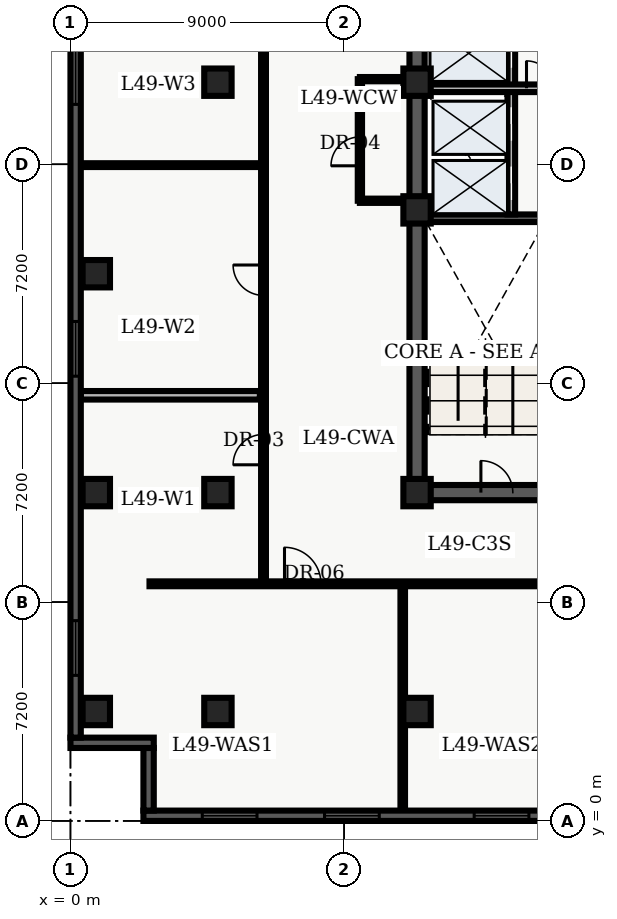
"""IFC4 building model, lengths in metres.
Left out: names, types, materials, properties, quantities, classifications, styles, units other than length and angle.
Written with IfcOpenShell. Run it as: python <this file> out.ifc"""

import sys

from ifc_helpers import new_model, entity, si_unit, converted_unit, direction, frame, origin_with_axes, origin_2d_with_axis, place, context, subcontext, project, spatial, polyline, rectangle, outline, extrude, element, fill, save


model = new_model("IFC4")
c1 = context("Model", 3, precision=1e-05, world=origin_with_axes(), true_north=direction((0.0, 1.0)))
c2 = subcontext(c1, "Body", "Model", "MODEL_VIEW")
j1 = project(units=[si_unit("LENGTHUNIT", "METRE"), converted_unit("PLANEANGLEUNIT", "DEGREE", entity("IfcPlaneAngleMeasure", 0.017), si_unit("PLANEANGLEUNIT", "RADIAN"), dimensions=[0, 0, 0, 0, 0, 0, 0])], contexts=[c1])
p1 = place(None, origin_with_axes())
s1 = spatial("IfcSite", under=j1, at=p1, CompositionType="ELEMENT")
p2 = place(p1, origin_with_axes())
s2 = spatial("IfcBuilding", under=s1, at=p2, CompositionType="ELEMENT")
p3 = place(p2, frame((0.0, 0.0, 200.4), z_axis=(0.0, 0.0, 1.0), x_axis=(1.0, 0.0, 0.0)))
s3 = spatial("IfcBuildingStorey", under=s2, at=p3, CompositionType="ELEMENT", Elevation=200.4)
p4 = place(p3, frame((11.4, 10.8, 0.0), z_axis=(0.0, 0.0, 1.0), x_axis=(0.0, 1.0, 0.0)))
e1 = element("IfcWall", 1, at=p4, inside=s3, PredefinedType="SHEAR", context=c2, shape_type="SweptSolid", body=[
    extrude(outline(polyline([(0.0, -0.25), (27.0, -0.25), (27.0, 0.25), (0.0, 0.25), (0.0, -0.25)])), origin_with_axes(), (0.0, 0.0, 1.0), 3.66),
])
p5 = place(p3, frame((11.4, 10.8, 0.0), z_axis=(0.0, 0.0, 1.0), x_axis=(1.0, 0.0, 0.0)))
e2 = element("IfcWall", 2, at=p5, inside=s3, PredefinedType="SHEAR", context=c2, shape_type="SweptSolid", body=[
    extrude(outline(polyline([(0.0, -0.25), (7.2, -0.25), (7.2, 0.25), (0.0, 0.25), (0.0, -0.25)])), origin_with_axes(), (0.0, 0.0, 1.0), 3.66),
])
p6 = place(p5, frame((2.625, 0.0, 0.0), z_axis=(0.0, 0.0, 1.0), x_axis=(1.0, 0.0, 0.0)))
e3 = element("IfcOpeningElement", 3, at=p6, cuts=e2, PredefinedType="OPENING", context=c2, shape_type="SweptSolid", body=[
    extrude(rectangle(XDim=1.05, YDim=0.52, at=origin_2d_with_axis()), origin_with_axes(), (0.0, 0.0, 1.0), 2.15),
])
p7 = place(p3, frame((11.65, 19.825, 0.0), z_axis=(0.0, 0.0, 1.0), x_axis=(1.0, 0.0, 0.0)))
e4 = element("IfcWall", 4, at=p7, inside=s3, PredefinedType="SHEAR", context=c2, shape_type="SweptSolid", body=[
    extrude(outline(polyline([(0.0, -0.125), (6.7, -0.125), (6.7, 0.125), (0.0, 0.125), (0.0, -0.125)])), origin_with_axes(), (0.0, 0.0, 1.0), 3.66),
])
p8 = place(p3, frame((14.5, 19.95, 0.0), z_axis=(0.0, 0.0, 1.0), x_axis=(0.0, 1.0, 0.0)))
e5 = element("IfcWall", 5, at=p8, inside=s3, PredefinedType="SOLIDWALL", context=c2, shape_type="SweptSolid", body=[
    extrude(outline(polyline([(0.0, -0.125), (6.25, -0.125), (6.25, 0.125), (0.0, 0.125), (0.0, -0.125)])), origin_with_axes(), (0.0, 0.0, 1.0), 2.7),
])
p9 = place(p8, frame((1.025, 0.0, 0.0), z_axis=(0.0, 0.0, 1.0), x_axis=(1.0, 0.0, 0.0)))
e6 = element("IfcOpeningElement", 6, at=p9, cuts=e5, PredefinedType="OPENING", context=c2, shape_type="SweptSolid", body=[
    extrude(rectangle(XDim=1.1, YDim=0.27, at=origin_2d_with_axis()), origin_with_axes(), (0.0, 0.0, 1.0), 2.15),
])
p10 = place(p8, frame((2.975, 0.0, 0.0), z_axis=(0.0, 0.0, 1.0), x_axis=(1.0, 0.0, 0.0)))
e7 = element("IfcOpeningElement", 7, at=p10, cuts=e5, PredefinedType="OPENING", context=c2, shape_type="SweptSolid", body=[
    extrude(rectangle(XDim=1.1, YDim=0.27, at=origin_2d_with_axis()), origin_with_axes(), (0.0, 0.0, 1.0), 2.15),
])
p11 = place(p8, frame((5.425, 0.0, 0.0), z_axis=(0.0, 0.0, 1.0), x_axis=(1.0, 0.0, 0.0)))
e8 = element("IfcOpeningElement", 8, at=p11, cuts=e5, PredefinedType="OPENING", context=c2, shape_type="SweptSolid", body=[
    extrude(rectangle(XDim=1.2, YDim=0.27, at=origin_2d_with_axis()), origin_with_axes(), (0.0, 0.0, 1.0), 2.15),
])
p12 = place(p3, frame((11.7, 24.1, 0.0), z_axis=(0.0, 0.0, 1.0), x_axis=(1.0, 0.0, 0.0)))
e9 = element("IfcWall", 9, at=p12, inside=s3, PredefinedType="SOLIDWALL", context=c2, shape_type="SweptSolid", body=[
    extrude(outline(polyline([(0.0, -0.125), (6.6, -0.125), (6.6, 0.125), (0.0, 0.125), (0.0, -0.125)])), origin_with_axes(), (0.0, 0.0, 1.0), 2.7),
])
p13 = place(p12, frame((3.75, 0.0, 0.0), z_axis=(0.0, 0.0, 1.0), x_axis=(1.0, 0.0, 0.0)))
e10 = element("IfcOpeningElement", 10, at=p13, cuts=e9, PredefinedType="OPENING", context=c2, shape_type="SweptSolid", body=[
    extrude(rectangle(XDim=0.9, YDim=0.27, at=origin_2d_with_axis()), origin_with_axes(), (0.0, 0.0, 1.0), 2.15),
])
for number, where, z_axis, x_axis in (
    (11, (11.4, 3.6, 0.0), (0.0, 0.0, 1.0), (1.0, 0.0, 0.0)),
    (12, (11.4, 10.8, 0.0), (0.0, 0.0, 1.0), (1.0, 0.0, 0.0)),
    (13, (11.4, 20.1, 0.0), (0.0, 0.0, 1.0), (1.0, 0.0, 0.0)),
    (14, (11.4, 24.3, 0.0), (0.0, 0.0, 1.0), (1.0, 0.0, 0.0)),
    (15, (4.85, 3.6, 0.0), (0.0, 0.0, 1.0), (1.0, 0.0, 0.0)),
    (16, (4.85, 10.8, 0.0), (0.0, 0.0, 1.0), (1.0, 0.0, 0.0)),
    (17, (4.85, 24.3, 0.0), (0.0, 0.0, 1.0), (1.0, 0.0, 0.0)),
    (18, (0.85, 3.6, 0.0), (0.0, 0.0, 1.0), (1.0, 0.0, 0.0)),
    (19, (0.85, 10.8, 0.0), (0.0, 0.0, 1.0), (1.0, 0.0, 0.0)),
    (20, (0.85, 18.0, 0.0), (0.0, 0.0, 1.0), (1.0, 0.0, 0.0)),
):
    element("IfcColumn", number, at=place(p3, frame(where, z_axis=z_axis, x_axis=x_axis)), inside=s3, PredefinedType="COLUMN", context=c2, shape_type="SweptSolid", body=[
        extrude(rectangle(XDim=0.9, YDim=0.9, at=origin_2d_with_axis()), origin_with_axes(), (0.0, 0.0, 1.0), 3.9),
    ])
p14 = place(p3, frame((9.52, 20.4, 0.0), z_axis=(0.0, 0.0, 1.0), x_axis=(0.0, 1.0, 0.0)))
e21 = element("IfcWall", 21, at=p14, inside=s3, PredefinedType="PARTITIONING", context=c2, shape_type="SweptSolid", body=[
    extrude(outline(polyline([(0.0, -0.07), (4.0, -0.07), (4.0, 0.07), (0.0, 0.07), (0.0, -0.07)])), origin_with_axes(), (0.0, 0.0, 1.0), 2.7),
])
p15 = place(p14, frame((1.625, 0.0, 0.0), z_axis=(0.0, 0.0, 1.0), x_axis=(1.0, 0.0, 0.0)))
e22 = element("IfcOpeningElement", 22, at=p15, cuts=e21, PredefinedType="OPENING", context=c2, shape_type="SweptSolid", body=[
    extrude(rectangle(XDim=0.95, YDim=0.16, at=origin_2d_with_axis()), origin_with_axes(), (0.0, 0.0, 1.0), 2.15),
])
for number, where, z_axis, x_axis in (
    (23, (9.52, 20.4, 0.0), (0.0, 0.0, 1.0), (1.0, 0.0, 0.0)),
    (24, (9.52, 24.4, 0.0), (0.0, 0.0, 1.0), (1.0, 0.0, 0.0)),
):
    element("IfcWall", number, at=place(p3, frame(where, z_axis=z_axis, x_axis=x_axis)), inside=s3, PredefinedType="PARTITIONING", context=c2, shape_type="SweptSolid", body=[
        extrude(outline(polyline([(0.0, -0.07), (1.58, -0.07), (1.58, 0.07), (0.0, 0.07), (0.0, -0.07)])), origin_with_axes(), (0.0, 0.0, 1.0), 2.7),
    ])
p16 = place(p3, frame((2.6, 7.8, 0.0), z_axis=(0.0, 0.0, 1.0), x_axis=(1.0, 0.0, 0.0)))
e25 = element("IfcWall", 25, at=p16, inside=s3, PredefinedType="PARTITIONING", context=c2, shape_type="SweptSolid", body=[
    extrude(outline(polyline([(0.0, -0.08), (18.55, -0.08), (18.55, 0.08), (0.0, 0.08), (0.0, -0.08)])), origin_with_axes(), (0.0, 0.0, 1.0), 2.7),
])
p17 = place(p16, frame((5.04, 0.0, 0.0), z_axis=(0.0, 0.0, 1.0), x_axis=(1.0, 0.0, 0.0)))
e26 = element("IfcOpeningElement", 26, at=p17, cuts=e25, PredefinedType="OPENING", context=c2, shape_type="SweptSolid", body=[
    extrude(rectangle(XDim=1.2, YDim=0.18, at=origin_2d_with_axis()), origin_with_axes(), (0.0, 0.0, 1.0), 2.2),
])
p18 = place(p16, frame((13.415, 0.0, 0.0), z_axis=(0.0, 0.0, 1.0), x_axis=(1.0, 0.0, 0.0)))
e27 = element("IfcOpeningElement", 27, at=p18, cuts=e25, PredefinedType="OPENING", context=c2, shape_type="SweptSolid", body=[
    extrude(rectangle(XDim=1.0, YDim=0.18, at=origin_2d_with_axis()), origin_with_axes(), (0.0, 0.0, 1.0), 2.15),
])
p19 = place(p3, frame((6.35, 7.8, 0.0), z_axis=(0.0, 0.0, 1.0), x_axis=(0.0, 1.0, 0.0)))
e28 = element("IfcWall", 28, at=p19, inside=s3, PredefinedType="PARTITIONING", context=c2, shape_type="SweptSolid", body=[
    extrude(outline(polyline([(0.0, -0.08), (32.7, -0.08), (32.7, 0.08), (0.0, 0.08), (0.0, -0.08)])), origin_with_axes(), (0.0, 0.0, 1.0), 2.7),
])
p20 = place(p19, frame((4.415, 0.0, 0.0), z_axis=(0.0, 0.0, 1.0), x_axis=(1.0, 0.0, 0.0)))
e29 = element("IfcOpeningElement", 29, at=p20, cuts=e28, PredefinedType="OPENING", context=c2, shape_type="SweptSolid", body=[
    extrude(rectangle(XDim=1.0, YDim=0.18, at=origin_2d_with_axis()), origin_with_axes(), (0.0, 0.0, 1.0), 2.15),
])
p21 = place(p19, frame((9.986, 0.0, 0.0), z_axis=(0.0, 0.0, 1.0), x_axis=(1.0, 0.0, 0.0)))
e30 = element("IfcOpeningElement", 30, at=p21, cuts=e28, PredefinedType="OPENING", context=c2, shape_type="SweptSolid", body=[
    extrude(rectangle(XDim=1.0, YDim=0.18, at=origin_2d_with_axis()), origin_with_axes(), (0.0, 0.0, 1.0), 2.15),
])
p22 = place(p19, frame((18.332, 0.0, 0.0), z_axis=(0.0, 0.0, 1.0), x_axis=(1.0, 0.0, 0.0)))
e31 = element("IfcOpeningElement", 31, at=p22, cuts=e28, PredefinedType="OPENING", context=c2, shape_type="SweptSolid", body=[
    extrude(rectangle(XDim=1.0, YDim=0.18, at=origin_2d_with_axis()), origin_with_axes(), (0.0, 0.0, 1.0), 2.15),
])
p23 = place(p19, frame((25.088, 0.0, 0.0), z_axis=(0.0, 0.0, 1.0), x_axis=(1.0, 0.0, 0.0)))
e32 = element("IfcOpeningElement", 32, at=p23, cuts=e28, PredefinedType="OPENING", context=c2, shape_type="SweptSolid", body=[
    extrude(rectangle(XDim=1.0, YDim=0.18, at=origin_2d_with_axis()), origin_with_axes(), (0.0, 0.0, 1.0), 2.15),
])
p24 = place(p19, frame((31.177, 0.0, 0.0), z_axis=(0.0, 0.0, 1.0), x_axis=(1.0, 0.0, 0.0)))
e33 = element("IfcOpeningElement", 33, at=p24, cuts=e28, PredefinedType="OPENING", context=c2, shape_type="SweptSolid", body=[
    extrude(rectangle(XDim=1.0, YDim=0.18, at=origin_2d_with_axis()), origin_with_axes(), (0.0, 0.0, 1.0), 2.15),
])
p25 = place(p3, frame((0.335, 14.001, 0.0), z_axis=(0.0, 0.0, 1.0), x_axis=(1.0, 0.0, 0.0)))
e34 = element("IfcWall", 34, at=p25, inside=s3, PredefinedType="PARTITIONING", context=c2, shape_type="SweptSolid", body=[
    extrude(outline(polyline([(0.0, -0.14), (5.895, -0.14), (5.895, 0.14), (0.0, 0.14), (0.0, -0.14)])), origin_with_axes(), (0.0, 0.0, 1.0), 2.7),
])
p26 = place(p3, frame((0.335, 21.572, 0.0), z_axis=(0.0, 0.0, 1.0), x_axis=(1.0, 0.0, 0.0)))
e35 = element("IfcWall", 35, at=p26, inside=s3, PredefinedType="PARTITIONING", context=c2, shape_type="SweptSolid", body=[
    extrude(outline(polyline([(0.0, -0.062), (5.895, -0.062), (5.895, 0.062), (0.0, 0.062), (0.0, -0.062)])), origin_with_axes(), (0.0, 0.0, 1.0), 2.7),
])
p27 = place(p3, frame((10.929, 0.335, 0.0), z_axis=(0.0, 0.0, 1.0), x_axis=(0.0, 1.0, 0.0)))
e36 = element("IfcWall", 36, at=p27, inside=s3, PredefinedType="PARTITIONING", context=c2, shape_type="SweptSolid", body=[
    extrude(outline(polyline([(0.0, -0.075), (7.365, -0.075), (7.365, 0.075), (0.0, 0.075), (0.0, -0.075)])), origin_with_axes(), (0.0, 0.0, 1.0), 2.7),
])
p28 = place(p3, frame((57.26, 0.17, 0.0), z_axis=(0.0, 0.0, 1.0), x_axis=(-1.0, 0.0, 0.0)))
e37 = element("IfcWall", 37, at=p28, inside=s3, PredefinedType="SOLIDWALL", context=c2, shape_type="SweptSolid", body=[
    extrude(outline(polyline([(0.0, -0.17), (54.86, -0.17), (54.86, 0.17), (0.0, 0.17), (0.0, -0.17)])), origin_with_axes(), (0.0, 0.0, 1.0), 3.66),
])
p29 = place(p28, frame((2.836, 0.0, 0.45), z_axis=(0.0, 0.0, 1.0), x_axis=(1.0, 0.0, 0.0)))
e38 = element("IfcOpeningElement", 38, at=p29, cuts=e37, PredefinedType="OPENING", context=c2, shape_type="SweptSolid", body=[
    extrude(rectangle(XDim=1.8, YDim=0.36, at=origin_2d_with_axis()), origin_with_axes(), (0.0, 0.0, 1.0), 2.1),
])
p30 = place(p28, frame((7.307, 0.0, 0.45), z_axis=(0.0, 0.0, 1.0), x_axis=(1.0, 0.0, 0.0)))
e39 = element("IfcOpeningElement", 39, at=p30, cuts=e37, PredefinedType="OPENING", context=c2, shape_type="SweptSolid", body=[
    extrude(rectangle(XDim=1.8, YDim=0.36, at=origin_2d_with_axis()), origin_with_axes(), (0.0, 0.0, 1.0), 2.1),
])
p31 = place(p28, frame((11.779, 0.0, 0.45), z_axis=(0.0, 0.0, 1.0), x_axis=(1.0, 0.0, 0.0)))
e40 = element("IfcOpeningElement", 40, at=p31, cuts=e37, PredefinedType="OPENING", context=c2, shape_type="SweptSolid", body=[
    extrude(rectangle(XDim=1.8, YDim=0.36, at=origin_2d_with_axis()), origin_with_axes(), (0.0, 0.0, 1.0), 2.1),
])
p32 = place(p28, frame((16.251, 0.0, 0.45), z_axis=(0.0, 0.0, 1.0), x_axis=(1.0, 0.0, 0.0)))
e41 = element("IfcOpeningElement", 41, at=p32, cuts=e37, PredefinedType="OPENING", context=c2, shape_type="SweptSolid", body=[
    extrude(rectangle(XDim=1.8, YDim=0.36, at=origin_2d_with_axis()), origin_with_axes(), (0.0, 0.0, 1.0), 2.1),
])
p33 = place(p28, frame((20.723, 0.0, 0.45), z_axis=(0.0, 0.0, 1.0), x_axis=(1.0, 0.0, 0.0)))
e42 = element("IfcOpeningElement", 42, at=p33, cuts=e37, PredefinedType="OPENING", context=c2, shape_type="SweptSolid", body=[
    extrude(rectangle(XDim=1.8, YDim=0.36, at=origin_2d_with_axis()), origin_with_axes(), (0.0, 0.0, 1.0), 2.1),
])
p34 = place(p28, frame((34.588, 0.0, 0.45), z_axis=(0.0, 0.0, 1.0), x_axis=(1.0, 0.0, 0.0)))
e43 = element("IfcOpeningElement", 43, at=p34, cuts=e37, PredefinedType="OPENING", context=c2, shape_type="SweptSolid", body=[
    extrude(rectangle(XDim=1.8, YDim=0.36, at=origin_2d_with_axis()), origin_with_axes(), (0.0, 0.0, 1.0), 2.1),
])
p35 = place(p28, frame((38.609, 0.0, 0.45), z_axis=(0.0, 0.0, 1.0), x_axis=(1.0, 0.0, 0.0)))
e44 = element("IfcOpeningElement", 44, at=p35, cuts=e37, PredefinedType="OPENING", context=c2, shape_type="SweptSolid", body=[
    extrude(rectangle(XDim=1.8, YDim=0.36, at=origin_2d_with_axis()), origin_with_axes(), (0.0, 0.0, 1.0), 2.1),
])
p36 = place(p28, frame((43.081, 0.0, 0.45), z_axis=(0.0, 0.0, 1.0), x_axis=(1.0, 0.0, 0.0)))
e45 = element("IfcOpeningElement", 45, at=p36, cuts=e37, PredefinedType="OPENING", context=c2, shape_type="SweptSolid", body=[
    extrude(rectangle(XDim=1.8, YDim=0.36, at=origin_2d_with_axis()), origin_with_axes(), (0.0, 0.0, 1.0), 2.1),
])
p37 = place(p28, frame((48.003, 0.0, 0.45), z_axis=(0.0, 0.0, 1.0), x_axis=(1.0, 0.0, 0.0)))
e46 = element("IfcOpeningElement", 46, at=p37, cuts=e37, PredefinedType="OPENING", context=c2, shape_type="SweptSolid", body=[
    extrude(rectangle(XDim=1.8, YDim=0.36, at=origin_2d_with_axis()), origin_with_axes(), (0.0, 0.0, 1.0), 2.1),
])
p38 = place(p28, frame((52.024, 0.0, 0.45), z_axis=(0.0, 0.0, 1.0), x_axis=(1.0, 0.0, 0.0)))
e47 = element("IfcOpeningElement", 47, at=p38, cuts=e37, PredefinedType="OPENING", context=c2, shape_type="SweptSolid", body=[
    extrude(rectangle(XDim=1.8, YDim=0.36, at=origin_2d_with_axis()), origin_with_axes(), (0.0, 0.0, 1.0), 2.1),
])
p39 = place(p3, frame((2.57, 0.34, 0.0), z_axis=(0.0, 0.0, 1.0), x_axis=(0.0, 1.0, 0.0)))
e48 = element("IfcWall", 48, at=p39, inside=s3, PredefinedType="SOLIDWALL", context=c2, shape_type="SweptSolid", body=[
    extrude(outline(polyline([(0.0, -0.17), (2.06, -0.17), (2.06, 0.17), (0.0, 0.17), (0.0, -0.17)])), origin_with_axes(), (0.0, 0.0, 1.0), 3.66),
])
p40 = place(p3, frame((2.74, 2.57, 0.0), z_axis=(0.0, 0.0, 1.0), x_axis=(-1.0, 0.0, 0.0)))
e49 = element("IfcWall", 49, at=p40, inside=s3, PredefinedType="SOLIDWALL", context=c2, shape_type="SweptSolid", body=[
    extrude(outline(polyline([(0.0, -0.17), (2.74, -0.17), (2.74, 0.17), (0.0, 0.17), (0.0, -0.17)])), origin_with_axes(), (0.0, 0.0, 1.0), 3.66),
])
p41 = place(p3, frame((0.17, 2.74, 0.0), z_axis=(0.0, 0.0, 1.0), x_axis=(0.0, 1.0, 0.0)))
e50 = element("IfcWall", 50, at=p41, inside=s3, PredefinedType="SOLIDWALL", context=c2, shape_type="SweptSolid", body=[
    extrude(outline(polyline([(0.0, -0.17), (43.46, -0.17), (43.46, 0.17), (0.0, 0.17), (0.0, -0.17)])), origin_with_axes(), (0.0, 0.0, 1.0), 3.66),
])
p42 = place(p41, frame((2.948, 0.0, 0.45), z_axis=(0.0, 0.0, 1.0), x_axis=(1.0, 0.0, 0.0)))
e51 = element("IfcOpeningElement", 51, at=p42, cuts=e50, PredefinedType="OPENING", context=c2, shape_type="SweptSolid", body=[
    extrude(rectangle(XDim=1.8, YDim=0.36, at=origin_2d_with_axis()), origin_with_axes(), (0.0, 0.0, 1.0), 2.1),
])
p43 = place(p41, frame((12.789, 0.0, 0.45), z_axis=(0.0, 0.0, 1.0), x_axis=(1.0, 0.0, 0.0)))
e52 = element("IfcOpeningElement", 52, at=p43, cuts=e50, PredefinedType="OPENING", context=c2, shape_type="SweptSolid", body=[
    extrude(rectangle(XDim=1.8, YDim=0.36, at=origin_2d_with_axis()), origin_with_axes(), (0.0, 0.0, 1.0), 2.1),
])
p44 = place(p41, frame((21.73, 0.0, 0.45), z_axis=(0.0, 0.0, 1.0), x_axis=(1.0, 0.0, 0.0)))
e53 = element("IfcOpeningElement", 53, at=p44, cuts=e50, PredefinedType="OPENING", context=c2, shape_type="SweptSolid", body=[
    extrude(rectangle(XDim=1.8, YDim=0.36, at=origin_2d_with_axis()), origin_with_axes(), (0.0, 0.0, 1.0), 2.1),
])
p45 = place(p41, frame((26.426, 0.0, 0.45), z_axis=(0.0, 0.0, 1.0), x_axis=(1.0, 0.0, 0.0)))
e54 = element("IfcOpeningElement", 54, at=p45, cuts=e50, PredefinedType="OPENING", context=c2, shape_type="SweptSolid", body=[
    extrude(rectangle(XDim=1.8, YDim=0.36, at=origin_2d_with_axis()), origin_with_axes(), (0.0, 0.0, 1.0), 2.1),
])
p46 = place(p41, frame((30.671, 0.0, 0.45), z_axis=(0.0, 0.0, 1.0), x_axis=(1.0, 0.0, 0.0)))
e55 = element("IfcOpeningElement", 55, at=p46, cuts=e50, PredefinedType="OPENING", context=c2, shape_type="SweptSolid", body=[
    extrude(rectangle(XDim=1.8, YDim=0.36, at=origin_2d_with_axis()), origin_with_axes(), (0.0, 0.0, 1.0), 2.1),
])
p47 = place(p41, frame((40.062, 0.0, 0.45), z_axis=(0.0, 0.0, 1.0), x_axis=(1.0, 0.0, 0.0)))
e56 = element("IfcOpeningElement", 56, at=p47, cuts=e50, PredefinedType="OPENING", context=c2, shape_type="SweptSolid", body=[
    extrude(rectangle(XDim=1.8, YDim=0.36, at=origin_2d_with_axis()), origin_with_axes(), (0.0, 0.0, 1.0), 2.1),
])
p48 = place(p8, frame((1.025, 0.0, 0.0), z_axis=(0.0, 0.0, 1.0), x_axis=(1.0, 0.0, 0.0)))
e57 = element("IfcDoor", 57, at=p48, inside=s3, OperationType="SLIDING_TO_LEFT", PredefinedType="DOOR", context=c2, shape_type="SweptSolid", body=[
    extrude(rectangle(XDim=1.1, YDim=0.09, at=origin_2d_with_axis()), origin_with_axes(), (0.0, 0.0, 1.0), 2.15),
])
fill(e6, e57)
p49 = place(p8, frame((2.975, 0.0, 0.0), z_axis=(0.0, 0.0, 1.0), x_axis=(1.0, 0.0, 0.0)))
e58 = element("IfcDoor", 58, at=p49, inside=s3, OperationType="SLIDING_TO_RIGHT", PredefinedType="DOOR", context=c2, shape_type="SweptSolid", body=[
    extrude(rectangle(XDim=1.1, YDim=0.09, at=origin_2d_with_axis()), origin_with_axes(), (0.0, 0.0, 1.0), 2.15),
])
fill(e7, e58)
p50 = place(p8, frame((5.425, 0.0, 0.0), z_axis=(0.0, 0.0, 1.0), x_axis=(1.0, 0.0, 0.0)))
e59 = element("IfcDoor", 59, at=p50, inside=s3, OperationType="DOUBLE_DOOR_SLIDING", PredefinedType="DOOR", context=c2, shape_type="SweptSolid", body=[
    extrude(rectangle(XDim=1.2, YDim=0.09, at=origin_2d_with_axis()), origin_with_axes(), (0.0, 0.0, 1.0), 2.15),
])
fill(e8, e59)
p51 = place(p5, frame((2.625, 0.0, 0.0), z_axis=(0.0, 0.0, 1.0), x_axis=(1.0, 0.0, 0.0)))
e60 = element("IfcDoor", 60, at=p51, inside=s3, OperationType="SINGLE_SWING_LEFT", PredefinedType="DOOR", context=c2, shape_type="SweptSolid", body=[
    extrude(rectangle(XDim=1.05, YDim=0.09, at=origin_2d_with_axis()), origin_with_axes(), (0.0, 0.0, 1.0), 2.15),
])
fill(e3, e60)
p52 = place(p12, frame((3.75, 0.0, 0.0), z_axis=(0.0, 0.0, 1.0), x_axis=(1.0, 0.0, 0.0)))
e61 = element("IfcDoor", 61, at=p52, inside=s3, OperationType="SINGLE_SWING_LEFT", PredefinedType="DOOR", context=c2, shape_type="SweptSolid", body=[
    extrude(rectangle(XDim=0.9, YDim=0.09, at=origin_2d_with_axis()), origin_with_axes(), (0.0, 0.0, 1.0), 2.15),
])
fill(e10, e61)
p53 = place(p14, frame((1.625, 0.0, 0.0), z_axis=(0.0, 0.0, 1.0), x_axis=(1.0, 0.0, 0.0)))
e62 = element("IfcDoor", 62, at=p53, inside=s3, OperationType="SINGLE_SWING_LEFT", PredefinedType="DOOR", context=c2, shape_type="SweptSolid", body=[
    extrude(rectangle(XDim=0.95, YDim=0.084, at=origin_2d_with_axis()), origin_with_axes(), (0.0, 0.0, 1.0), 2.15),
])
fill(e22, e62)
p54 = place(p19, frame((4.415, 0.0, 0.0), z_axis=(0.0, 0.0, 1.0), x_axis=(1.0, 0.0, 0.0)))
e63 = element("IfcDoor", 63, at=p54, inside=s3, OperationType="SINGLE_SWING_LEFT", PredefinedType="DOOR", context=c2, shape_type="SweptSolid", body=[
    extrude(rectangle(XDim=1.0, YDim=0.09, at=origin_2d_with_axis()), origin_with_axes(), (0.0, 0.0, 1.0), 2.15),
])
fill(e29, e63)
p55 = place(p19, frame((9.986, 0.0, 0.0), z_axis=(0.0, 0.0, 1.0), x_axis=(1.0, 0.0, 0.0)))
e64 = element("IfcDoor", 64, at=p55, inside=s3, OperationType="SINGLE_SWING_RIGHT", PredefinedType="DOOR", context=c2, shape_type="SweptSolid", body=[
    extrude(rectangle(XDim=1.0, YDim=0.09, at=origin_2d_with_axis()), origin_with_axes(), (0.0, 0.0, 1.0), 2.15),
])
fill(e30, e64)
p56 = place(p16, frame((5.04, 0.0, 0.0), z_axis=(0.0, 0.0, 1.0), x_axis=(1.0, 0.0, 0.0)))
e65 = element("IfcDoor", 65, at=p56, inside=s3, OperationType="SINGLE_SWING_LEFT", PredefinedType="DOOR", context=c2, shape_type="SweptSolid", body=[
    extrude(rectangle(XDim=1.2, YDim=0.09, at=origin_2d_with_axis()), origin_with_axes(), (0.0, 0.0, 1.0), 2.2),
])
fill(e26, e65)
p57 = place(p28, frame((43.081, 0.0, 0.45), z_axis=(0.0, 0.0, 1.0), x_axis=(1.0, 0.0, 0.0)))
e66 = element("IfcWindow", 66, at=p57, inside=s3, PredefinedType="WINDOW", context=c2, shape_type="SweptSolid", body=[
    extrude(rectangle(XDim=1.8, YDim=0.09, at=origin_2d_with_axis()), origin_with_axes(), (0.0, 0.0, 1.0), 2.1),
])
fill(e45, e66)
p58 = place(p28, frame((48.003, 0.0, 0.45), z_axis=(0.0, 0.0, 1.0), x_axis=(1.0, 0.0, 0.0)))
e67 = element("IfcWindow", 67, at=p58, inside=s3, PredefinedType="WINDOW", context=c2, shape_type="SweptSolid", body=[
    extrude(rectangle(XDim=1.8, YDim=0.09, at=origin_2d_with_axis()), origin_with_axes(), (0.0, 0.0, 1.0), 2.1),
])
fill(e46, e67)
p59 = place(p28, frame((52.024, 0.0, 0.45), z_axis=(0.0, 0.0, 1.0), x_axis=(1.0, 0.0, 0.0)))
e68 = element("IfcWindow", 68, at=p59, inside=s3, PredefinedType="WINDOW", context=c2, shape_type="SweptSolid", body=[
    extrude(rectangle(XDim=1.8, YDim=0.09, at=origin_2d_with_axis()), origin_with_axes(), (0.0, 0.0, 1.0), 2.1),
])
fill(e47, e68)
p60 = place(p41, frame((2.948, 0.0, 0.45), z_axis=(0.0, 0.0, 1.0), x_axis=(1.0, 0.0, 0.0)))
e69 = element("IfcWindow", 69, at=p60, inside=s3, PredefinedType="WINDOW", context=c2, shape_type="SweptSolid", body=[
    extrude(rectangle(XDim=1.8, YDim=0.09, at=origin_2d_with_axis()), origin_with_axes(), (0.0, 0.0, 1.0), 2.1),
])
fill(e51, e69)
p61 = place(p41, frame((12.789, 0.0, 0.45), z_axis=(0.0, 0.0, 1.0), x_axis=(1.0, 0.0, 0.0)))
e70 = element("IfcWindow", 70, at=p61, inside=s3, PredefinedType="WINDOW", context=c2, shape_type="SweptSolid", body=[
    extrude(rectangle(XDim=1.8, YDim=0.09, at=origin_2d_with_axis()), origin_with_axes(), (0.0, 0.0, 1.0), 2.1),
])
fill(e52, e70)
p62 = place(p41, frame((21.73, 0.0, 0.45), z_axis=(0.0, 0.0, 1.0), x_axis=(1.0, 0.0, 0.0)))
e71 = element("IfcWindow", 71, at=p62, inside=s3, PredefinedType="WINDOW", context=c2, shape_type="SweptSolid", body=[
    extrude(rectangle(XDim=1.8, YDim=0.09, at=origin_2d_with_axis()), origin_with_axes(), (0.0, 0.0, 1.0), 2.1),
])
fill(e53, e71)
save(model, sys.argv[1])
